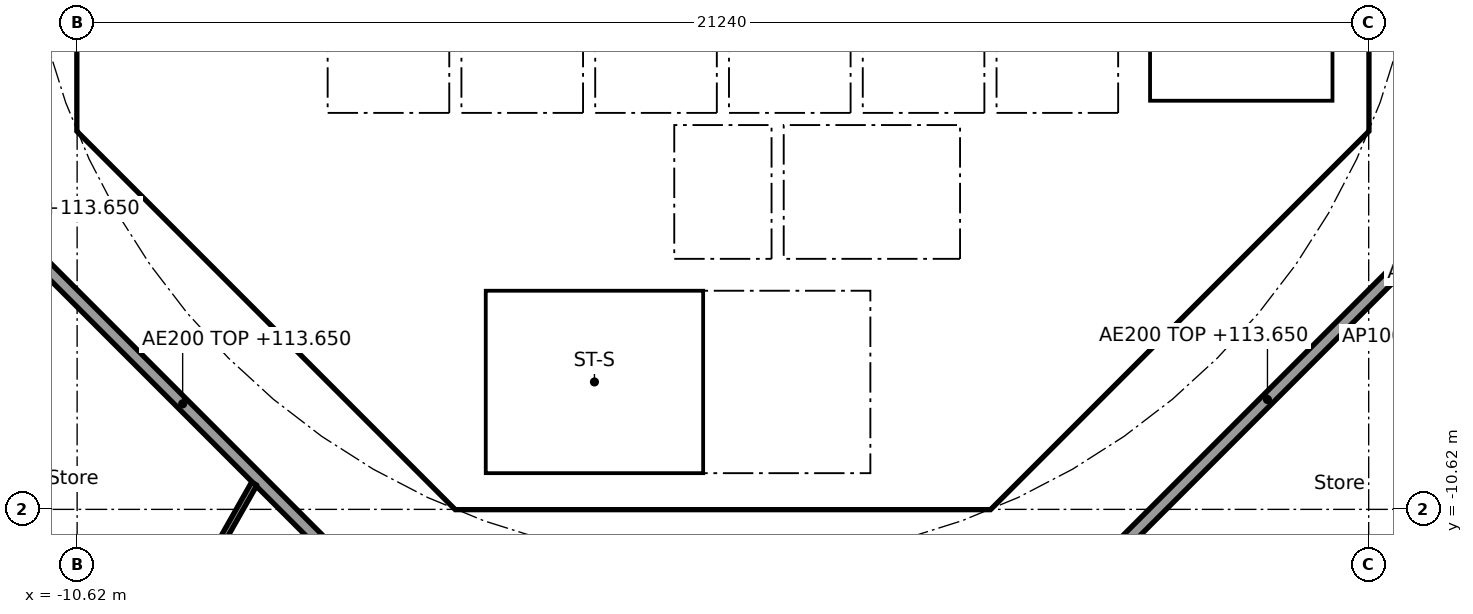
"""IFC4 building model, lengths in metres.
Left out: names, types, materials, properties, quantities, classifications, styles, units other than length and angle.
Written with IfcOpenShell. Run it as: python <this file> out.ifc"""

import sys

from ifc_helpers import new_model, si_unit, direction, frame, frame_2d, origin, place, context, subcontext, project, spatial, polyline, rectangle, outline, extrude, element, fill, save


model = new_model("IFC4")
c1 = context("Model", 3, precision=1e-05, world=origin(), true_north=direction((0.0, 1.0)))
c2 = subcontext(c1, "Body", "Model", "MODEL_VIEW")
j1 = project(units=[si_unit("LENGTHUNIT", "METRE"), si_unit("PLANEANGLEUNIT", "RADIAN")], contexts=[c1])
p1 = place(None, origin())
s1 = spatial("IfcSite", under=j1, at=p1, CompositionType="ELEMENT")
p2 = place(p1, origin())
s2 = spatial("IfcBuilding", under=s1, at=p2, CompositionType="ELEMENT")
p3 = place(p2, frame((0.0, 0.0, 110.3)))
s3 = spatial("IfcBuildingStorey", under=s2, at=p3, CompositionType="ELEMENT", Elevation=110.3)
p4 = place(p3, frame((-10.325, 3.801, 0.0), z_axis=(0.0, 0.0, 1.0), x_axis=(0.0, -1.0, 0.0)))
e1 = element("IfcWall", 1, at=p4, inside=s3, PredefinedType="SHEAR", context=c2, shape_type="SweptSolid", body=[
    extrude(rectangle(XDim=7.602, YDim=0.6, at=frame_2d((3.801, 0.0))), origin(), (0.0, 0.0, 1.0), 3.35),
])
p5 = place(p4, frame((0.651, 0.0, 0.0)))
e2 = element("IfcOpeningElement", 2, at=p5, cuts=e1, PredefinedType="OPENING", context=c2, shape_type="SweptSolid", body=[
    extrude(rectangle(XDim=1.5, YDim=2.1, at=frame_2d((0.75, 1.05))), frame((0.0, 0.31, 0.0), z_axis=(0.0, -1.0, 0.0), x_axis=(1.0, 0.0, 0.0)), (0.0, 0.0, 1.0), 0.62),
])
p6 = place(p4, frame((5.451, 0.0, 0.0)))
e3 = element("IfcOpeningElement", 3, at=p6, cuts=e1, PredefinedType="OPENING", context=c2, shape_type="SweptSolid", body=[
    extrude(rectangle(XDim=1.5, YDim=2.1, at=frame_2d((0.75, 1.05))), frame((0.0, 0.31, 0.0), z_axis=(0.0, -1.0, 0.0), x_axis=(1.0, 0.0, 0.0)), (0.0, 0.0, 1.0), 0.62),
])
p7 = place(p3, frame((-9.988, -4.613, 0.0), z_axis=(0.0, 0.0, 1.0), x_axis=(0.707106781187, -0.707106781187, 0.0)))
e4 = element("IfcWall", 4, at=p7, inside=s3, PredefinedType="SHEAR", context=c2, shape_type="SweptSolid", body=[
    extrude(rectangle(XDim=7.602, YDim=0.6, at=frame_2d((3.801, 0.0))), origin(), (0.0, 0.0, 1.0), 3.35),
])
p8 = place(p7, frame((6.151, 0.0, 0.0)))
e5 = element("IfcOpeningElement", 5, at=p8, cuts=e4, PredefinedType="OPENING", context=c2, shape_type="SweptSolid", body=[
    extrude(rectangle(XDim=1.1, YDim=2.1, at=frame_2d((0.55, 1.05))), frame((0.0, 0.31, 0.0), z_axis=(0.0, -1.0, 0.0), x_axis=(1.0, 0.0, 0.0)), (0.0, 0.0, 1.0), 0.62),
])
p9 = place(p3, frame((4.613, -9.988, 0.0), z_axis=(0.0, 0.0, 1.0), x_axis=(0.707106781187, 0.707106781187, 0.0)))
e6 = element("IfcWall", 6, at=p9, inside=s3, PredefinedType="SHEAR", context=c2, shape_type="SweptSolid", body=[
    extrude(rectangle(XDim=7.602, YDim=0.6, at=frame_2d((3.801, 0.0))), origin(), (0.0, 0.0, 1.0), 3.35),
])
p10 = place(p9, frame((3.201, 0.0, 0.0)))
e7 = element("IfcOpeningElement", 7, at=p10, cuts=e6, PredefinedType="OPENING", context=c2, shape_type="SweptSolid", body=[
    extrude(rectangle(XDim=1.2, YDim=2.1, at=frame_2d((0.6, 1.05))), frame((0.0, 0.31, 0.0), z_axis=(0.0, -1.0, 0.0), x_axis=(1.0, 0.0, 0.0)), (0.0, 0.0, 1.0), 0.62),
])
p11 = place(p3, frame((4.0, -10.025, 0.0), z_axis=(0.0, 0.0, 1.0), x_axis=(0.0, 1.0, 0.0)))
e8 = element("IfcWall", 8, at=p11, inside=s3, PredefinedType="SOLIDWALL", context=c2, shape_type="SweptSolid", body=[
    extrude(rectangle(XDim=3.0, YDim=0.2, at=frame_2d((1.5, 0.0))), origin(), (0.0, 0.0, 1.0), 3.35),
])
p12 = place(p11, frame((0.975, 0.0, 0.0)))
e9 = element("IfcOpeningElement", 9, at=p12, cuts=e8, PredefinedType="OPENING", context=c2, shape_type="SweptSolid", body=[
    extrude(rectangle(XDim=1.1, YDim=2.1, at=frame_2d((0.55, 1.05))), frame((0.0, 0.11, 0.0), z_axis=(0.0, -1.0, 0.0), x_axis=(1.0, 0.0, 0.0)), (0.0, 0.0, 1.0), 0.22),
])
p13 = place(p3, frame((-5.8, -8.227, 0.0), z_axis=(0.0, 0.0, 1.0), x_axis=(0.0, 1.0, 0.0)))
e10 = element("IfcWall", 10, at=p13, inside=s3, PredefinedType="PARTITIONING", context=c2, shape_type="SweptSolid", body=[
    extrude(rectangle(XDim=3.927, YDim=0.15, at=frame_2d((1.963, 0.0))), origin(), (0.0, 0.0, 1.0), 3.35),
])
p14 = place(p13, frame((2.615, 0.0, 0.0)))
e11 = element("IfcOpeningElement", 11, at=p14, cuts=e10, PredefinedType="OPENING", context=c2, shape_type="SweptSolid", body=[
    extrude(rectangle(XDim=0.9, YDim=2.1, at=frame_2d((0.45, 1.05))), frame((0.0, 0.085, 0.0), z_axis=(0.0, -1.0, 0.0), x_axis=(1.0, 0.0, 0.0)), (0.0, 0.0, 1.0), 0.17),
])
p15 = place(p13, frame((0.539, 0.0, 0.0)))
e12 = element("IfcOpeningElement", 12, at=p15, cuts=e10, PredefinedType="OPENING", context=c2, shape_type="SweptSolid", body=[
    extrude(rectangle(XDim=0.9, YDim=2.1, at=frame_2d((0.45, 1.05))), frame((0.0, 0.085, 0.0), z_axis=(0.0, -1.0, 0.0), x_axis=(1.0, 0.0, 0.0)), (0.0, 0.0, 1.0), 0.17),
])
p16 = place(p3, frame((4.0, -6.5, 0.0), z_axis=(0.0, 0.0, 1.0), x_axis=(0.0, 1.0, 0.0)))
e13 = element("IfcWall", 13, at=p16, inside=s3, PredefinedType="SOLIDWALL", context=c2, shape_type="SweptSolid", body=[
    extrude(rectangle(XDim=2.2, YDim=0.2, at=frame_2d((1.1, 0.0))), origin(), (0.0, 0.0, 1.0), 3.35),
])
p17 = place(p16, frame((0.55, 0.0, 0.0)))
e14 = element("IfcOpeningElement", 14, at=p17, cuts=e13, PredefinedType="OPENING", context=c2, shape_type="SweptSolid", body=[
    extrude(rectangle(XDim=1.1, YDim=2.1, at=frame_2d((0.55, 1.05))), frame((0.0, 0.11, 0.0), z_axis=(0.0, -1.0, 0.0), x_axis=(1.0, 0.0, 0.0)), (0.0, 0.0, 1.0), 0.22),
])
p18 = place(p3, frame((-4.0, -6.5, 0.0), z_axis=(0.0, 0.0, 1.0), x_axis=(0.0, 1.0, 0.0)))
e15 = element("IfcWall", 15, at=p18, inside=s3, PredefinedType="SOLIDWALL", context=c2, shape_type="SweptSolid", body=[
    extrude(rectangle(XDim=2.2, YDim=0.2, at=frame_2d((1.1, 0.0))), origin(), (0.0, 0.0, 1.0), 3.35),
])
p19 = place(p18, frame((0.65, 0.0, 0.0)))
e16 = element("IfcOpeningElement", 16, at=p19, cuts=e15, PredefinedType="OPENING", context=c2, shape_type="SweptSolid", body=[
    extrude(rectangle(XDim=0.9, YDim=2.1, at=frame_2d((0.45, 1.05))), frame((0.0, 0.11, 0.0), z_axis=(0.0, -1.0, 0.0), x_axis=(1.0, 0.0, 0.0)), (0.0, 0.0, 1.0), 0.22),
])
p20 = place(p3, origin())
e17 = element("IfcWall", 17, at=p20, inside=s3, PredefinedType="SHEAR", context=c2, shape_type="SweptSolid", body=[
    extrude(outline(polyline([(-10.625, -3.801), (-10.025, -3.801), (-10.025, -4.152), (-9.776, -4.401), (-10.2, -4.825), (-10.625, -4.401), (-10.625, -3.801)])), origin(), (0.0, 0.0, 1.0), 3.35),
])
p21 = place(p3, origin())
e18 = element("IfcWall", 18, at=p21, inside=s3, PredefinedType="SHEAR", context=c2, shape_type="SweptSolid", body=[
    extrude(outline(polyline([(-4.152, -10.025), (4.152, -10.025), (4.401, -9.776), (4.825, -10.2), (4.401, -10.625), (-4.401, -10.625), (-4.825, -10.2), (-4.401, -9.776), (-4.152, -10.025)])), origin(), (0.0, 0.0, 1.0), 3.35),
])
p22 = place(p3, origin())
e19 = element("IfcWall", 19, at=p22, inside=s3, PredefinedType="SHEAR", context=c2, shape_type="SweptSolid", body=[
    extrude(outline(polyline([(9.776, -4.401), (10.025, -4.152), (10.025, -3.801), (10.025, 4.152), (9.776, 4.401), (10.2, 4.825), (10.625, 4.401), (10.625, -4.401), (10.2, -4.825), (9.776, -4.401)])), origin(), (0.0, 0.0, 1.0), 3.35),
])
p23 = place(p3, frame((-10.025, -4.0, 0.0), z_axis=(0.0, 0.0, 1.0), x_axis=(1.0, 0.0, 0.0)))
e20 = element("IfcWall", 20, at=p23, inside=s3, PredefinedType="PARTITIONING", context=c2, shape_type="SweptSolid", body=[
    extrude(rectangle(XDim=3.325, YDim=0.2, at=frame_2d((1.662, 0.0))), origin(), (0.0, 0.0, 1.0), 3.35),
])
p24 = place(p3, frame((-8.001, -6.1, 0.0), z_axis=(0.0, 0.0, 1.0), x_axis=(1.0, 0.0, 0.0)))
e21 = element("IfcWall", 21, at=p24, inside=s3, PredefinedType="PARTITIONING", context=c2, shape_type="SweptSolid", body=[
    extrude(rectangle(XDim=2.126, YDim=0.15, at=frame_2d((1.063, 0.0))), origin(), (0.0, 0.0, 1.0), 3.35),
])
for number, where, z_axis, x_axis in (
    (22, (-0.9, -6.5, 0.0), (0.0, 0.0, 1.0), (0.0, 1.0, 0.0)),
    (23, (0.9, -6.5, 0.0), (0.0, 0.0, 1.0), (0.0, 1.0, 0.0)),
):
    element("IfcWall", number, at=place(p3, frame(where, z_axis=z_axis, x_axis=x_axis)), inside=s3, PredefinedType="SOLIDWALL", context=c2, shape_type="SweptSolid", body=[
        extrude(rectangle(XDim=2.2, YDim=0.2, at=frame_2d((1.1, 0.0))), origin(), (0.0, 0.0, 1.0), 3.35),
    ])
p25 = place(p3, origin())
e24 = element("IfcWall", 24, at=p25, inside=s3, PredefinedType="SOLIDWALL", context=c2, shape_type="SweptSolid", body=[
    extrude(outline(polyline([(-6.7, -2.1), (-6.5, -2.1), (-6.5, -4.1), (-4.5, -4.1), (-4.5, -2.1), (-4.3, -2.1), (-4.3, -4.1), (-2.3, -4.1), (-2.3, -2.1), (-2.1, -2.1), (-2.1, -4.1), (-0.1, -4.1), (-0.1, -2.1), (0.1, -2.1), (0.1, -4.1), (2.1, -4.1), (2.1, -2.1), (2.3, -2.1), (2.3, -4.1), (4.3, -4.1), (4.3, -2.1), (4.5, -2.1), (4.5, -4.1), (6.5, -4.1), (6.5, -2.1), (6.7, -2.1), (6.7, -4.3), (-6.7, -4.3), (-6.7, -2.1)])), origin(), (0.0, 0.0, 1.0), 3.35),
])
p26 = place(p3, origin())
e25 = element("IfcWall", 25, at=p26, inside=s3, PredefinedType="SOLIDWALL", context=c2, shape_type="SweptSolid", body=[
    extrude(outline(polyline([(-3.9, -10.025), (-4.1, -10.025), (-4.1, -7.025), (-3.9, -7.025), (-3.9, -10.025)])), origin(), (0.0, 0.0, 1.0), 3.35),
])
p27 = place(p3, origin())
e26 = element("IfcWall", 26, at=p27, inside=s3, PredefinedType="SOLIDWALL", context=c2, shape_type="SweptSolid", body=[
    extrude(outline(polyline([(4.1, -7.025), (-4.1, -7.025), (-4.1, -6.5), (4.1, -6.5), (4.1, -7.025)])), origin(), (0.0, 0.0, 1.0), 3.35),
])
p28 = place(p3, origin())
e27 = element("IfcWall", 27, at=p28, inside=s3, PredefinedType="SOLIDWALL", context=c2, shape_type="SweptSolid", body=[
    extrude(outline(polyline([(7.025, -3.9), (6.7, -3.9), (6.7, 3.9), (7.025, 3.9), (7.025, -3.9)])), origin(), (0.0, 0.0, 1.0), 3.35),
])
p29 = place(p3, origin())
e28 = element("IfcWall", 28, at=p29, inside=s3, PredefinedType="SOLIDWALL", context=c2, shape_type="SweptSolid", body=[
    extrude(outline(polyline([(10.025, -4.1), (6.7, -4.1), (6.7, -3.9), (10.025, -3.9), (10.025, -4.1)])), origin(), (0.0, 0.0, 1.0), 3.35),
])
p30 = place(p3, frame((-12.635, -5.134, 0.0), z_axis=(0.0, 0.0, 1.0), x_axis=(0.707106781187, -0.707106781187, 0.0)))
e29 = element("IfcWall", 29, at=p30, inside=s3, PredefinedType="PARTITIONING", context=c2, shape_type="SweptSolid", body=[
    extrude(rectangle(XDim=10.609, YDim=0.2, at=frame_2d((5.305, 0.0))), origin(), (0.0, 0.0, 1.0), 3.35),
])
p31 = place(p3, frame((5.275, -12.494, 0.0), z_axis=(0.0, 0.0, 1.0), x_axis=(0.707106781187, 0.707106781187, 0.0)))
e30 = element("IfcWall", 30, at=p31, inside=s3, PredefinedType="PARTITIONING", context=c2, shape_type="SweptSolid", body=[
    extrude(rectangle(XDim=10.409, YDim=0.2, at=frame_2d((5.205, 0.0))), origin(), (0.0, 0.0, 1.0), 3.35),
])
p32 = place(p3, frame((-13.118, -10.8, 0.0), z_axis=(0.0, 0.0, 1.0), x_axis=(0.72818280142, -0.685382964273, 0.0)))
e31 = element("IfcWall", 31, at=p32, inside=s3, PredefinedType="PARTITIONING", context=c2, shape_type="SweptSolid", body=[
    extrude(rectangle(XDim=4.586, YDim=0.1, at=frame_2d((2.293, 0.0))), origin(), (0.0, 0.0, 1.0), 2.597),
])
p33 = place(p3, frame((-7.707, -10.198, 0.0), z_axis=(0.0, 0.0, 1.0), x_axis=(-0.493986531217, -0.869469554945, 0.0)))
e32 = element("IfcWall", 32, at=p33, inside=s3, PredefinedType="PARTITIONING", context=c2, shape_type="SweptSolid", body=[
    extrude(rectangle(XDim=4.217, YDim=0.1, at=frame_2d((2.109, 0.0))), origin(), (0.0, 0.0, 1.0), 2.447),
])
p34 = place(p17, origin())
e33 = element("IfcDoor", 33, at=p34, inside=s3, OperationType="DOUBLE_DOOR_SLIDING", PredefinedType="DOOR", context=c2, shape_type="SweptSolid", body=[
    extrude(rectangle(XDim=1.1, YDim=2.1, at=frame_2d((0.55, 1.05))), frame((0.0, 0.025, 0.0), z_axis=(0.0, -1.0, 0.0), x_axis=(1.0, 0.0, 0.0)), (0.0, 0.0, 1.0), 0.05),
])
fill(e14, e33)
p35 = place(p12, origin())
e34 = element("IfcDoor", 34, at=p35, inside=s3, OperationType="SINGLE_SWING_LEFT", PredefinedType="DOOR", context=c2, shape_type="SweptSolid", body=[
    extrude(rectangle(XDim=1.1, YDim=2.1, at=frame_2d((0.55, 1.05))), frame((0.0, 0.025, 0.0), z_axis=(0.0, -1.0, 0.0), x_axis=(1.0, 0.0, 0.0)), (0.0, 0.0, 1.0), 0.05),
])
fill(e9, e34)
p36 = place(p14, origin())
e35 = element("IfcDoor", 35, at=p36, inside=s3, OperationType="SINGLE_SWING_LEFT", PredefinedType="DOOR", context=c2, shape_type="SweptSolid", body=[
    extrude(rectangle(XDim=0.9, YDim=2.1, at=frame_2d((0.45, 1.05))), frame((0.0, 0.025, 0.0), z_axis=(0.0, -1.0, 0.0), x_axis=(1.0, 0.0, 0.0)), (0.0, 0.0, 1.0), 0.05),
])
fill(e11, e35)
p37 = place(p15, origin())
e36 = element("IfcDoor", 36, at=p37, inside=s3, OperationType="SINGLE_SWING_LEFT", PredefinedType="DOOR", context=c2, shape_type="SweptSolid", body=[
    extrude(rectangle(XDim=0.9, YDim=2.1, at=frame_2d((0.45, 1.05))), frame((0.0, 0.025, 0.0), z_axis=(0.0, -1.0, 0.0), x_axis=(1.0, 0.0, 0.0)), (0.0, 0.0, 1.0), 0.05),
])
fill(e12, e36)
p38 = place(p19, frame((0.9, 0.0, 0.0), x_axis=(-1.0, 0.0, 0.0)))
e37 = element("IfcDoor", 37, at=p38, inside=s3, OperationType="SINGLE_SWING_LEFT", PredefinedType="DOOR", context=c2, shape_type="SweptSolid", body=[
    extrude(rectangle(XDim=0.9, YDim=2.1, at=frame_2d((0.45, 1.05))), frame((0.0, 0.025, 0.0), z_axis=(0.0, -1.0, 0.0), x_axis=(1.0, 0.0, 0.0)), (0.0, 0.0, 1.0), 0.05),
])
fill(e16, e37)
p39 = place(p10, origin())
e38 = element("IfcDoor", 38, at=p39, inside=s3, OperationType="SINGLE_SWING_RIGHT", PredefinedType="DOOR", context=c2, shape_type="SweptSolid", body=[
    extrude(rectangle(XDim=1.2, YDim=2.1, at=frame_2d((0.6, 1.05))), frame((0.0, 0.025, 0.0), z_axis=(0.0, -1.0, 0.0), x_axis=(1.0, 0.0, 0.0)), (0.0, 0.0, 1.0), 0.05),
])
fill(e7, e38)
p40 = place(p6, origin())
e39 = element("IfcDoor", 39, at=p40, inside=s3, OperationType="DOUBLE_DOOR_SINGLE_SWING", PredefinedType="DOOR", context=c2, shape_type="SweptSolid", body=[
    extrude(rectangle(XDim=1.5, YDim=2.1, at=frame_2d((0.75, 1.05))), frame((0.0, 0.025, 0.0), z_axis=(0.0, -1.0, 0.0), x_axis=(1.0, 0.0, 0.0)), (0.0, 0.0, 1.0), 0.05),
])
fill(e3, e39)
p41 = place(p8, origin())
e40 = element("IfcDoor", 40, at=p41, inside=s3, OperationType="SINGLE_SWING_RIGHT", PredefinedType="DOOR", context=c2, shape_type="SweptSolid", body=[
    extrude(rectangle(XDim=1.1, YDim=2.1, at=frame_2d((0.55, 1.05))), frame((0.0, 0.025, 0.0), z_axis=(0.0, -1.0, 0.0), x_axis=(1.0, 0.0, 0.0)), (0.0, 0.0, 1.0), 0.05),
])
fill(e5, e40)
save(model, sys.argv[1])
